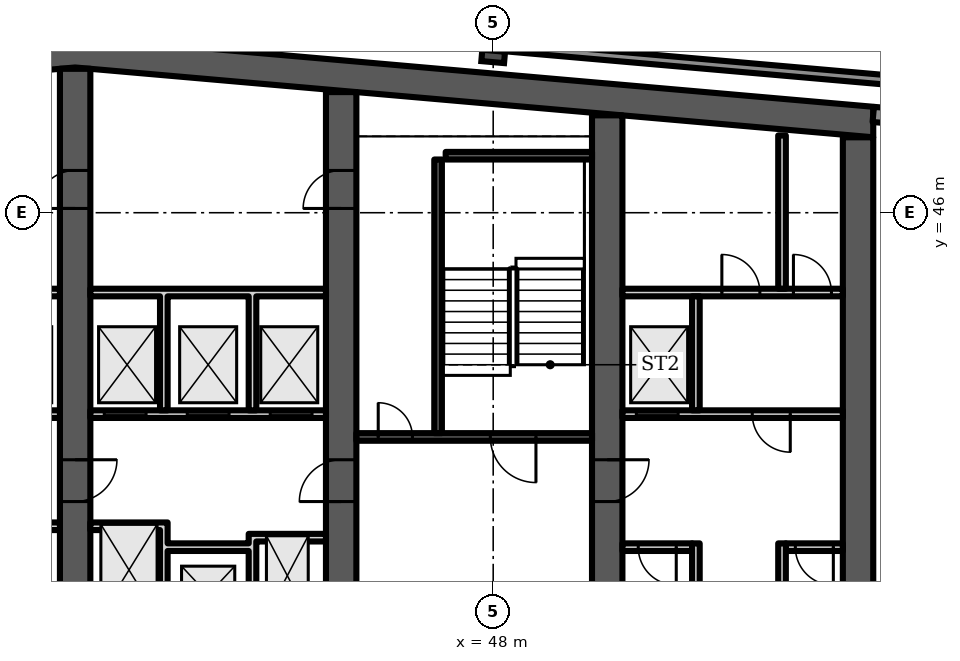
"""IFC4 building model, lengths in metres.
Left out: names, types, materials, properties, quantities, classifications, styles, units other than length and angle.
Written with IfcOpenShell. Run it as: python <this file> out.ifc"""

import sys

from ifc_helpers import new_model, si_unit, direction, frame, frame_2d, origin, origin_2d, place, context, subcontext, project, spatial, polyline, rectangle, i_section, outline, extrude, element, fill, save


model = new_model("IFC4")
c1 = context("Model", 3, precision=1e-05, world=origin(), true_north=direction((0.0, 1.0)))
c2 = subcontext(c1, "Body", "Model", "MODEL_VIEW")
j1 = project(units=[si_unit("LENGTHUNIT", "METRE"), si_unit("PLANEANGLEUNIT", "RADIAN")], contexts=[c1])
p1 = place(None, origin())
s1 = spatial("IfcSite", under=j1, at=p1, CompositionType="ELEMENT")
p2 = place(p1, origin())
s2 = spatial("IfcBuilding", under=s1, at=p2, CompositionType="ELEMENT")
p3 = place(p2, frame((0.0, 0.0, 151.9)))
s3 = spatial("IfcBuildingStorey", under=s2, at=p3, CompositionType="ELEMENT", Elevation=151.9)
p4 = place(p3, origin())
e1 = element("IfcWall", 1, at=p4, inside=s3, PredefinedType="SHEAR", context=c2, shape_type="SweptSolid", body=[
    extrude(outline(polyline([(16.0, 47.984), (37.0, 49.822), (58.0, 47.984), (58.0, 48.787), (37.0, 50.625), (16.0, 48.787), (16.0, 47.984)])), origin(), (0.0, 0.0, 1.0), 3.6),
])
p5 = place(p3, frame((37.0, 34.8, 0.0), z_axis=(0.0, 0.0, 1.0), x_axis=(0.0, 1.0, 0.0)))
e2 = element("IfcWall", 2, at=p5, inside=s3, PredefinedType="SHEAR", context=c2, shape_type="SweptSolid", body=[
    extrude(rectangle(XDim=14.987, YDim=0.8, at=frame_2d((7.493, 0.0))), origin(), (0.0, 0.0, 1.0), 3.6),
])
p6 = place(p5, frame((11.312, 0.0, 0.0)))
e3 = element("IfcOpeningElement", 3, at=p6, cuts=e2, PredefinedType="OPENING", context=c2, shape_type="SweptSolid", body=[
    extrude(rectangle(XDim=1.0, YDim=2.1, at=frame_2d((0.5, 1.05))), frame((0.0, 0.41, 0.0), z_axis=(0.0, -1.0, 0.0), x_axis=(1.0, 0.0, 0.0)), (0.0, 0.0, 1.0), 0.82),
])
p7 = place(p5, frame((3.6, 0.0, 0.0)))
e4 = element("IfcOpeningElement", 4, at=p7, cuts=e2, PredefinedType="OPENING", context=c2, shape_type="SweptSolid", body=[
    extrude(rectangle(XDim=1.1, YDim=2.1, at=frame_2d((0.55, 1.05))), frame((0.0, 0.41, 0.0), z_axis=(0.0, -1.0, 0.0), x_axis=(1.0, 0.0, 0.0)), (0.0, 0.0, 1.0), 0.82),
])
p8 = place(p3, frame((44.0, 34.8, 0.0), z_axis=(0.0, 0.0, 1.0), x_axis=(0.0, 1.0, 0.0)))
e5 = element("IfcWall", 5, at=p8, inside=s3, PredefinedType="SHEAR", context=c2, shape_type="SweptSolid", body=[
    extrude(rectangle(XDim=14.374, YDim=0.8, at=frame_2d((7.187, 0.0))), origin(), (0.0, 0.0, 1.0), 3.6),
])
p9 = place(p8, frame((11.312, 0.0, 0.0)))
e6 = element("IfcOpeningElement", 6, at=p9, cuts=e5, PredefinedType="OPENING", context=c2, shape_type="SweptSolid", body=[
    extrude(rectangle(XDim=1.0, YDim=2.1, at=frame_2d((0.5, 1.05))), frame((0.0, 0.41, 0.0), z_axis=(0.0, -1.0, 0.0), x_axis=(1.0, 0.0, 0.0)), (0.0, 0.0, 1.0), 0.82),
])
p10 = place(p8, frame((3.6, 0.0, 0.0)))
e7 = element("IfcOpeningElement", 7, at=p10, cuts=e5, PredefinedType="OPENING", context=c2, shape_type="SweptSolid", body=[
    extrude(rectangle(XDim=1.1, YDim=2.1, at=frame_2d((0.55, 1.05))), frame((0.0, 0.41, 0.0), z_axis=(0.0, -1.0, 0.0), x_axis=(1.0, 0.0, 0.0)), (0.0, 0.0, 1.0), 0.82),
])
p11 = place(p3, frame((51.0, 34.8, 0.0), z_axis=(0.0, 0.0, 1.0), x_axis=(0.0, 1.0, 0.0)))
e8 = element("IfcWall", 8, at=p11, inside=s3, PredefinedType="SHEAR", context=c2, shape_type="SweptSolid", body=[
    extrude(rectangle(XDim=13.762, YDim=0.8, at=frame_2d((6.881, 0.0))), origin(), (0.0, 0.0, 1.0), 3.6),
])
p12 = place(p11, frame((3.6, 0.0, 0.0)))
e9 = element("IfcOpeningElement", 9, at=p12, cuts=e8, PredefinedType="OPENING", context=c2, shape_type="SweptSolid", body=[
    extrude(rectangle(XDim=1.1, YDim=2.1, at=frame_2d((0.55, 1.05))), frame((0.0, 0.41, 0.0), z_axis=(0.0, -1.0, 0.0), x_axis=(1.0, 0.0, 0.0)), (0.0, 0.0, 1.0), 0.82),
])
p13 = place(p3, frame((57.6, 34.8, 0.0), z_axis=(0.0, 0.0, 1.0), x_axis=(0.0, 1.0, 0.0)))
e10 = element("IfcWall", 10, at=p13, inside=s3, PredefinedType="SHEAR", context=c2, shape_type="SweptSolid", body=[
    extrude(rectangle(XDim=13.184, YDim=0.8, at=frame_2d((6.592, 0.0))), origin(), (0.0, 0.0, 1.0), 3.6),
])
p14 = place(p3, frame((48.0, 50.112, 0.0), z_axis=(0.0, 0.0, 1.0), x_axis=(0.087156, 0.996198, 0.0)))
e11 = element("IfcColumn", 11, at=p14, inside=s3, PredefinedType="COLUMN", context=c2, shape_type="SweptSolid", body=[
    extrude(i_section(OverallWidth=0.3, OverallDepth=0.6, WebThickness=0.015, FlangeThickness=0.03, FilletRadius=0.027, at=origin_2d()), origin(), (0.0, 0.0, 1.0), 3.6),
])
p15 = place(p3, frame((60.983, 48.326, 0.0), z_axis=(0.0, 0.0, 1.0), x_axis=(-0.996194, 0.087168, 0.0)))
e12 = element("IfcWall", 12, at=p15, inside=s3, PredefinedType="SOLIDWALL", context=c2, shape_type="SweptSolid", body=[
    extrude(rectangle(XDim=2.994, YDim=0.4, at=frame_2d((1.497, 0.0))), origin(), (0.0, 0.0, 1.0), 3.2),
])
p16 = place(p3, frame((40.5, 51.056, 0.0), z_axis=(0.0, 0.0, 1.0), x_axis=(0.996199, -0.087155, 0.0)))
e13 = element("IfcWall", 13, at=p16, inside=s3, PredefinedType="PARAPET", context=c2, shape_type="SweptSolid", body=[
    extrude(rectangle(XDim=27.855, YDim=0.25, at=frame_2d((13.928, 0.0))), origin(), (0.0, 0.0, 1.0), 1.1),
])
p17 = place(p3, frame((30.4, 40.7, 0.0), z_axis=(0.0, 0.0, 1.0), x_axis=(1.0, 0.0, 0.0)))
e14 = element("IfcWall", 14, at=p17, inside=s3, PredefinedType="PARTITIONING", context=c2, shape_type="SweptSolid", body=[
    extrude(rectangle(XDim=6.2, YDim=0.2, at=frame_2d((3.1, 0.0))), origin(), (0.0, 0.0, 1.0), 3.2),
])
p18 = place(p17, frame((0.367, 0.0, 0.0)))
e15 = element("IfcOpeningElement", 15, at=p18, cuts=e14, PredefinedType="OPENING", context=c2, shape_type="SweptSolid", body=[
    extrude(rectangle(XDim=1.1, YDim=2.1, at=frame_2d((0.55, 1.05))), frame((0.0, 0.11, 0.0), z_axis=(0.0, -1.0, 0.0), x_axis=(1.0, 0.0, 0.0)), (0.0, 0.0, 1.0), 0.22),
])
p19 = place(p17, frame((2.55, 0.0, 0.0)))
e16 = element("IfcOpeningElement", 16, at=p19, cuts=e14, PredefinedType="OPENING", context=c2, shape_type="SweptSolid", body=[
    extrude(rectangle(XDim=1.1, YDim=2.1, at=frame_2d((0.55, 1.05))), frame((0.0, 0.11, 0.0), z_axis=(0.0, -1.0, 0.0), x_axis=(1.0, 0.0, 0.0)), (0.0, 0.0, 1.0), 0.22),
])
p20 = place(p17, frame((4.733, 0.0, 0.0)))
e17 = element("IfcOpeningElement", 17, at=p20, cuts=e14, PredefinedType="OPENING", context=c2, shape_type="SweptSolid", body=[
    extrude(rectangle(XDim=1.1, YDim=2.1, at=frame_2d((0.55, 1.05))), frame((0.0, 0.11, 0.0), z_axis=(0.0, -1.0, 0.0), x_axis=(1.0, 0.0, 0.0)), (0.0, 0.0, 1.0), 0.22),
])
p21 = place(p3, origin())
e18 = element("IfcWall", 18, at=p21, inside=s3, PredefinedType="PARTITIONING", context=c2, shape_type="SweptSolid", body=[
    extrude(outline(polyline([(34.567, 37.85), (34.767, 37.85), (36.6, 37.85), (36.6, 37.65), (34.767, 37.65), (34.767, 34.8), (34.567, 34.8), (34.567, 37.85)])), origin(), (0.0, 0.0, 1.0), 3.2),
])
p22 = place(p3, origin())
e19 = element("IfcWall", 19, at=p22, inside=s3, PredefinedType="PARTITIONING", context=c2, shape_type="SweptSolid", body=[
    extrude(outline(polyline([(32.433, 40.8), (32.233, 40.8), (32.233, 43.8), (30.4, 43.8), (30.4, 44.0), (36.6, 44.0), (36.6, 43.8), (34.767, 43.8), (34.767, 40.8), (34.567, 40.8), (34.567, 43.8), (32.433, 43.8), (32.433, 40.8)])), origin(), (0.0, 0.0, 1.0), 3.2),
])
p23 = place(p3, frame((37.4, 40.7, 0.0), z_axis=(0.0, 0.0, 1.0), x_axis=(1.0, 0.0, 0.0)))
e20 = element("IfcWall", 20, at=p23, inside=s3, PredefinedType="PARTITIONING", context=c2, shape_type="SweptSolid", body=[
    extrude(rectangle(XDim=6.2, YDim=0.2, at=frame_2d((3.1, 0.0))), origin(), (0.0, 0.0, 1.0), 3.2),
])
p24 = place(p23, frame((0.367, 0.0, 0.0)))
e21 = element("IfcOpeningElement", 21, at=p24, cuts=e20, PredefinedType="OPENING", context=c2, shape_type="SweptSolid", body=[
    extrude(rectangle(XDim=1.1, YDim=2.1, at=frame_2d((0.55, 1.05))), frame((0.0, 0.11, 0.0), z_axis=(0.0, -1.0, 0.0), x_axis=(1.0, 0.0, 0.0)), (0.0, 0.0, 1.0), 0.22),
])
p25 = place(p23, frame((2.55, 0.0, 0.0)))
e22 = element("IfcOpeningElement", 22, at=p25, cuts=e20, PredefinedType="OPENING", context=c2, shape_type="SweptSolid", body=[
    extrude(rectangle(XDim=1.1, YDim=2.1, at=frame_2d((0.55, 1.05))), frame((0.0, 0.11, 0.0), z_axis=(0.0, -1.0, 0.0), x_axis=(1.0, 0.0, 0.0)), (0.0, 0.0, 1.0), 0.22),
])
p26 = place(p23, frame((4.733, 0.0, 0.0)))
e23 = element("IfcOpeningElement", 23, at=p26, cuts=e20, PredefinedType="OPENING", context=c2, shape_type="SweptSolid", body=[
    extrude(rectangle(XDim=1.1, YDim=2.1, at=frame_2d((0.55, 1.05))), frame((0.0, 0.11, 0.0), z_axis=(0.0, -1.0, 0.0), x_axis=(1.0, 0.0, 0.0)), (0.0, 0.0, 1.0), 0.22),
])
p27 = place(p3, origin())
e24 = element("IfcWall", 24, at=p27, inside=s3, PredefinedType="PARTITIONING", context=c2, shape_type="SweptSolid", body=[
    extrude(outline(polyline([(41.567, 37.1), (39.433, 37.1), (39.433, 34.8), (39.233, 34.8), (39.233, 37.65), (37.4, 37.65), (37.4, 37.85), (39.233, 37.85), (39.433, 37.85), (39.433, 37.3), (41.567, 37.3), (41.567, 37.55), (41.767, 37.55), (43.6, 37.55), (43.6, 37.35), (41.767, 37.35), (41.767, 34.8), (41.567, 34.8), (41.567, 37.1)])), origin(), (0.0, 0.0, 1.0), 3.2),
])
p28 = place(p3, origin())
e25 = element("IfcWall", 25, at=p28, inside=s3, PredefinedType="PARTITIONING", context=c2, shape_type="SweptSolid", body=[
    extrude(outline(polyline([(39.433, 40.8), (39.233, 40.8), (39.233, 43.8), (37.4, 43.8), (37.4, 44.0), (43.6, 44.0), (43.6, 43.8), (41.767, 43.8), (41.767, 40.8), (41.567, 40.8), (41.567, 43.8), (39.433, 43.8), (39.433, 40.8)])), origin(), (0.0, 0.0, 1.0), 3.2),
])
p29 = place(p3, frame((44.4, 40.1, 0.0), z_axis=(0.0, 0.0, 1.0), x_axis=(1.0, 0.0, 0.0)))
e26 = element("IfcWall", 26, at=p29, inside=s3, PredefinedType="SHEAR", context=c2, shape_type="SweptSolid", body=[
    extrude(rectangle(XDim=6.2, YDim=0.2, at=frame_2d((3.1, 0.0))), origin(), (0.0, 0.0, 1.0), 3.2),
])
p30 = place(p29, frame((3.525, 0.0, 0.0)))
e27 = element("IfcOpeningElement", 27, at=p30, cuts=e26, PredefinedType="OPENING", context=c2, shape_type="SweptSolid", body=[
    extrude(rectangle(XDim=1.2, YDim=2.1, at=frame_2d((0.6, 1.05))), frame((0.0, 0.11, 0.0), z_axis=(0.0, -1.0, 0.0), x_axis=(1.0, 0.0, 0.0)), (0.0, 0.0, 1.0), 0.22),
])
p31 = place(p29, frame((0.575, 0.0, 0.0)))
e28 = element("IfcOpeningElement", 28, at=p31, cuts=e26, PredefinedType="OPENING", context=c2, shape_type="SweptSolid", body=[
    extrude(rectangle(XDim=0.9, YDim=2.1, at=frame_2d((0.45, 1.05))), frame((0.0, 0.11, 0.0), z_axis=(0.0, -1.0, 0.0), x_axis=(1.0, 0.0, 0.0)), (0.0, 0.0, 1.0), 0.22),
])
p32 = place(p3, frame((46.55, 40.2, 0.0), z_axis=(0.0, 0.0, 1.0), x_axis=(0.0, 1.0, 0.0)))
e29 = element("IfcWall", 29, at=p32, inside=s3, PredefinedType="SHEAR", context=c2, shape_type="SweptSolid", body=[
    extrude(rectangle(XDim=7.2, YDim=0.2, at=frame_2d((3.6, 0.0))), origin(), (0.0, 0.0, 1.0), 3.2),
])
p33 = place(p3, frame((46.75, 47.5, 0.0), z_axis=(0.0, 0.0, 1.0), x_axis=(1.0, 0.0, 0.0)))
e30 = element("IfcWall", 30, at=p33, inside=s3, PredefinedType="SHEAR", context=c2, shape_type="SweptSolid", body=[
    extrude(rectangle(XDim=3.85, YDim=0.2, at=frame_2d((1.925, 0.0))), origin(), (0.0, 0.0, 1.0), 3.2),
])
p34 = place(p3, frame((51.4, 37.2, 0.0), z_axis=(0.0, 0.0, 1.0), x_axis=(1.0, 0.0, 0.0)))
e31 = element("IfcWall", 31, at=p34, inside=s3, PredefinedType="PARTITIONING", context=c2, shape_type="SweptSolid", body=[
    extrude(rectangle(XDim=1.833, YDim=0.2, at=frame_2d((0.917, 0.0))), origin(), (0.0, 0.0, 1.0), 3.2),
])
p35 = place(p34, frame((0.417, 0.0, 0.0)))
e32 = element("IfcOpeningElement", 32, at=p35, cuts=e31, PredefinedType="OPENING", context=c2, shape_type="SweptSolid", body=[
    extrude(rectangle(XDim=1.0, YDim=2.1, at=frame_2d((0.5, 1.05))), frame((0.0, 0.11, 0.0), z_axis=(0.0, -1.0, 0.0), x_axis=(1.0, 0.0, 0.0)), (0.0, 0.0, 1.0), 0.22),
])
p36 = place(p3, frame((55.7, 37.2, 0.0), z_axis=(0.0, 0.0, 1.0), x_axis=(1.0, 0.0, 0.0)))
e33 = element("IfcWall", 33, at=p36, inside=s3, PredefinedType="PARTITIONING", context=c2, shape_type="SweptSolid", body=[
    extrude(rectangle(XDim=1.5, YDim=0.2, at=frame_2d((0.75, 0.0))), origin(), (0.0, 0.0, 1.0), 3.2),
])
p37 = place(p36, frame((0.25, 0.0, 0.0)))
e34 = element("IfcOpeningElement", 34, at=p37, cuts=e33, PredefinedType="OPENING", context=c2, shape_type="SweptSolid", body=[
    extrude(rectangle(XDim=1.0, YDim=2.1, at=frame_2d((0.5, 1.05))), frame((0.0, 0.11, 0.0), z_axis=(0.0, -1.0, 0.0), x_axis=(1.0, 0.0, 0.0)), (0.0, 0.0, 1.0), 0.22),
])
p38 = place(p3, frame((51.4, 40.7, 0.0), z_axis=(0.0, 0.0, 1.0), x_axis=(1.0, 0.0, 0.0)))
e35 = element("IfcWall", 35, at=p38, inside=s3, PredefinedType="PARTITIONING", context=c2, shape_type="SweptSolid", body=[
    extrude(rectangle(XDim=5.8, YDim=0.2, at=frame_2d((2.9, 0.0))), origin(), (0.0, 0.0, 1.0), 3.2),
])
p39 = place(p38, frame((0.367, 0.0, 0.0)))
e36 = element("IfcOpeningElement", 36, at=p39, cuts=e35, PredefinedType="OPENING", context=c2, shape_type="SweptSolid", body=[
    extrude(rectangle(XDim=1.1, YDim=2.1, at=frame_2d((0.55, 1.05))), frame((0.0, 0.11, 0.0), z_axis=(0.0, -1.0, 0.0), x_axis=(1.0, 0.0, 0.0)), (0.0, 0.0, 1.0), 0.22),
])
p40 = place(p38, frame((3.417, 0.0, 0.0)))
e37 = element("IfcOpeningElement", 37, at=p40, cuts=e35, PredefinedType="OPENING", context=c2, shape_type="SweptSolid", body=[
    extrude(rectangle(XDim=1.0, YDim=2.1, at=frame_2d((0.5, 1.05))), frame((0.0, 0.11, 0.0), z_axis=(0.0, -1.0, 0.0), x_axis=(1.0, 0.0, 0.0)), (0.0, 0.0, 1.0), 0.22),
])
p41 = place(p3, frame((51.4, 43.9, 0.0), z_axis=(0.0, 0.0, 1.0), x_axis=(1.0, 0.0, 0.0)))
e38 = element("IfcWall", 38, at=p41, inside=s3, PredefinedType="PARTITIONING", context=c2, shape_type="SweptSolid", body=[
    extrude(rectangle(XDim=5.8, YDim=0.2, at=frame_2d((2.9, 0.0))), origin(), (0.0, 0.0, 1.0), 3.2),
])
p42 = place(p41, frame((2.617, 0.0, 0.0)))
e39 = element("IfcOpeningElement", 39, at=p42, cuts=e38, PredefinedType="OPENING", context=c2, shape_type="SweptSolid", body=[
    extrude(rectangle(XDim=1.0, YDim=2.1, at=frame_2d((0.5, 1.05))), frame((0.0, 0.11, 0.0), z_axis=(0.0, -1.0, 0.0), x_axis=(1.0, 0.0, 0.0)), (0.0, 0.0, 1.0), 0.22),
])
p43 = place(p41, frame((4.5, 0.0, 0.0)))
e40 = element("IfcOpeningElement", 40, at=p43, cuts=e38, PredefinedType="OPENING", context=c2, shape_type="SweptSolid", body=[
    extrude(rectangle(XDim=1.0, YDim=2.1, at=frame_2d((0.5, 1.05))), frame((0.0, 0.11, 0.0), z_axis=(0.0, -1.0, 0.0), x_axis=(1.0, 0.0, 0.0)), (0.0, 0.0, 1.0), 0.22),
])
p44 = place(p3, origin())
e41 = element("IfcWall", 41, at=p44, inside=s3, PredefinedType="PARTITIONING", context=c2, shape_type="SweptSolid", body=[
    extrude(outline(polyline([(53.233, 34.8), (53.233, 37.3), (53.433, 37.3), (53.433, 34.8), (53.233, 34.8)])), origin(), (0.0, 0.0, 1.0), 3.2),
])
p45 = place(p3, origin())
e42 = element("IfcWall", 42, at=p45, inside=s3, PredefinedType="PARTITIONING", context=c2, shape_type="SweptSolid", body=[
    extrude(outline(polyline([(55.5, 34.8), (55.5, 37.3), (55.7, 37.3), (55.7, 34.8), (55.5, 34.8)])), origin(), (0.0, 0.0, 1.0), 3.2),
])
p46 = place(p3, origin())
e43 = element("IfcWall", 43, at=p46, inside=s3, PredefinedType="PARTITIONING", context=c2, shape_type="SweptSolid", body=[
    extrude(outline(polyline([(53.433, 40.8), (53.433, 43.8), (53.233, 43.8), (53.233, 40.8), (53.433, 40.8)])), origin(), (0.0, 0.0, 1.0), 3.2),
])
p47 = place(p3, frame((55.6, 44.0, 0.0), z_axis=(0.0, 0.0, 1.0), x_axis=(0.0, 1.0, 0.0)))
e44 = element("IfcWall", 44, at=p47, inside=s3, PredefinedType="PARTITIONING", context=c2, shape_type="SweptSolid", body=[
    extrude(rectangle(XDim=4.034, YDim=0.2, at=frame_2d((2.017, 0.0))), origin(), (0.0, 0.0, 1.0), 3.2),
])
p48 = place(p6, origin())
e45 = element("IfcDoor", 45, at=p48, inside=s3, OperationType="SINGLE_SWING_LEFT", PredefinedType="DOOR", context=c2, shape_type="SweptSolid", body=[
    extrude(rectangle(XDim=1.0, YDim=2.1, at=frame_2d((0.5, 1.05))), frame((0.0, 0.4, 0.0), z_axis=(0.0, -1.0, 0.0), x_axis=(1.0, 0.0, 0.0)), (0.0, 0.0, 1.0), 0.8),
])
fill(e3, e45)
p49 = place(p24, origin())
e46 = element("IfcDoor", 46, at=p49, inside=s3, OperationType="DOUBLE_DOOR_SLIDING", PredefinedType="DOOR", context=c2, shape_type="SweptSolid", body=[
    extrude(rectangle(XDim=1.1, YDim=2.1, at=frame_2d((0.55, 1.05))), frame((0.0, 0.025, 0.0), z_axis=(0.0, -1.0, 0.0), x_axis=(1.0, 0.0, 0.0)), (0.0, 0.0, 1.0), 0.05),
])
fill(e21, e46)
p50 = place(p25, origin())
e47 = element("IfcDoor", 47, at=p50, inside=s3, OperationType="DOUBLE_DOOR_SLIDING", PredefinedType="DOOR", context=c2, shape_type="SweptSolid", body=[
    extrude(rectangle(XDim=1.1, YDim=2.1, at=frame_2d((0.55, 1.05))), frame((0.0, 0.025, 0.0), z_axis=(0.0, -1.0, 0.0), x_axis=(1.0, 0.0, 0.0)), (0.0, 0.0, 1.0), 0.05),
])
fill(e22, e47)
p51 = place(p26, origin())
e48 = element("IfcDoor", 48, at=p51, inside=s3, OperationType="DOUBLE_DOOR_SLIDING", PredefinedType="DOOR", context=c2, shape_type="SweptSolid", body=[
    extrude(rectangle(XDim=1.1, YDim=2.1, at=frame_2d((0.55, 1.05))), frame((0.0, 0.025, 0.0), z_axis=(0.0, -1.0, 0.0), x_axis=(1.0, 0.0, 0.0)), (0.0, 0.0, 1.0), 0.05),
])
fill(e23, e48)
p52 = place(p9, origin())
e49 = element("IfcDoor", 49, at=p52, inside=s3, OperationType="SINGLE_SWING_LEFT", PredefinedType="DOOR", context=c2, shape_type="SweptSolid", body=[
    extrude(rectangle(XDim=1.0, YDim=2.1, at=frame_2d((0.5, 1.05))), frame((0.0, 0.4, 0.0), z_axis=(0.0, -1.0, 0.0), x_axis=(1.0, 0.0, 0.0)), (0.0, 0.0, 1.0), 0.8),
])
fill(e6, e49)
p53 = place(p30, origin())
e50 = element("IfcDoor", 50, at=p53, inside=s3, OperationType="SINGLE_SWING_RIGHT", PredefinedType="DOOR", context=c2, shape_type="SweptSolid", body=[
    extrude(rectangle(XDim=1.2, YDim=2.1, at=frame_2d((0.6, 1.05))), frame((0.0, 0.025, 0.0), z_axis=(0.0, -1.0, 0.0), x_axis=(1.0, 0.0, 0.0)), (0.0, 0.0, 1.0), 0.05),
])
fill(e27, e50)
p54 = place(p31, origin())
e51 = element("IfcDoor", 51, at=p54, inside=s3, OperationType="SINGLE_SWING_LEFT", PredefinedType="DOOR", context=c2, shape_type="SweptSolid", body=[
    extrude(rectangle(XDim=0.9, YDim=2.1, at=frame_2d((0.45, 1.05))), frame((0.0, 0.025, 0.0), z_axis=(0.0, -1.0, 0.0), x_axis=(1.0, 0.0, 0.0)), (0.0, 0.0, 1.0), 0.05),
])
fill(e28, e51)
p55 = place(p35, origin())
e52 = element("IfcDoor", 52, at=p55, inside=s3, OperationType="SINGLE_SWING_RIGHT", PredefinedType="DOOR", context=c2, shape_type="SweptSolid", body=[
    extrude(rectangle(XDim=1.0, YDim=2.1, at=frame_2d((0.5, 1.05))), frame((0.0, 0.025, 0.0), z_axis=(0.0, -1.0, 0.0), x_axis=(1.0, 0.0, 0.0)), (0.0, 0.0, 1.0), 0.05),
])
fill(e32, e52)
p56 = place(p37, origin())
e53 = element("IfcDoor", 53, at=p56, inside=s3, OperationType="SINGLE_SWING_RIGHT", PredefinedType="DOOR", context=c2, shape_type="SweptSolid", body=[
    extrude(rectangle(XDim=1.0, YDim=2.1, at=frame_2d((0.5, 1.05))), frame((0.0, 0.025, 0.0), z_axis=(0.0, -1.0, 0.0), x_axis=(1.0, 0.0, 0.0)), (0.0, 0.0, 1.0), 0.05),
])
fill(e34, e53)
p57 = place(p39, origin())
e54 = element("IfcDoor", 54, at=p57, inside=s3, OperationType="DOUBLE_DOOR_SLIDING", PredefinedType="DOOR", context=c2, shape_type="SweptSolid", body=[
    extrude(rectangle(XDim=1.1, YDim=2.1, at=frame_2d((0.55, 1.05))), frame((0.0, 0.025, 0.0), z_axis=(0.0, -1.0, 0.0), x_axis=(1.0, 0.0, 0.0)), (0.0, 0.0, 1.0), 0.05),
])
fill(e36, e54)
p58 = place(p40, origin())
e55 = element("IfcDoor", 55, at=p58, inside=s3, OperationType="SINGLE_SWING_RIGHT", PredefinedType="DOOR", context=c2, shape_type="SweptSolid", body=[
    extrude(rectangle(XDim=1.0, YDim=2.1, at=frame_2d((0.5, 1.05))), frame((0.0, 0.025, 0.0), z_axis=(0.0, -1.0, 0.0), x_axis=(1.0, 0.0, 0.0)), (0.0, 0.0, 1.0), 0.05),
])
fill(e37, e55)
p59 = place(p42, origin())
e56 = element("IfcDoor", 56, at=p59, inside=s3, OperationType="SINGLE_SWING_LEFT", PredefinedType="DOOR", context=c2, shape_type="SweptSolid", body=[
    extrude(rectangle(XDim=1.0, YDim=2.1, at=frame_2d((0.5, 1.05))), frame((0.0, 0.025, 0.0), z_axis=(0.0, -1.0, 0.0), x_axis=(1.0, 0.0, 0.0)), (0.0, 0.0, 1.0), 0.05),
])
fill(e39, e56)
p60 = place(p43, origin())
e57 = element("IfcDoor", 57, at=p60, inside=s3, OperationType="SINGLE_SWING_LEFT", PredefinedType="DOOR", context=c2, shape_type="SweptSolid", body=[
    extrude(rectangle(XDim=1.0, YDim=2.1, at=frame_2d((0.5, 1.05))), frame((0.0, 0.025, 0.0), z_axis=(0.0, -1.0, 0.0), x_axis=(1.0, 0.0, 0.0)), (0.0, 0.0, 1.0), 0.05),
])
fill(e40, e57)
p61 = place(p7, origin())
e58 = element("IfcDoor", 58, at=p61, inside=s3, OperationType="SINGLE_SWING_RIGHT", PredefinedType="DOOR", context=c2, shape_type="SweptSolid", body=[
    extrude(rectangle(XDim=1.1, YDim=2.1, at=frame_2d((0.55, 1.05))), frame((0.0, 0.025, 0.0), z_axis=(0.0, -1.0, 0.0), x_axis=(1.0, 0.0, 0.0)), (0.0, 0.0, 1.0), 0.05),
])
fill(e4, e58)
p62 = place(p10, origin())
e59 = element("IfcDoor", 59, at=p62, inside=s3, OperationType="SINGLE_SWING_LEFT", PredefinedType="DOOR", context=c2, shape_type="SweptSolid", body=[
    extrude(rectangle(XDim=1.1, YDim=2.1, at=frame_2d((0.55, 1.05))), frame((0.0, 0.025, 0.0), z_axis=(0.0, -1.0, 0.0), x_axis=(1.0, 0.0, 0.0)), (0.0, 0.0, 1.0), 0.05),
])
fill(e7, e59)
p63 = place(p12, origin())
e60 = element("IfcDoor", 60, at=p63, inside=s3, OperationType="SINGLE_SWING_RIGHT", PredefinedType="DOOR", context=c2, shape_type="SweptSolid", body=[
    extrude(rectangle(XDim=1.1, YDim=2.1, at=frame_2d((0.55, 1.05))), frame((0.0, 0.025, 0.0), z_axis=(0.0, -1.0, 0.0), x_axis=(1.0, 0.0, 0.0)), (0.0, 0.0, 1.0), 0.05),
])
fill(e9, e60)
save(model, sys.argv[1])
